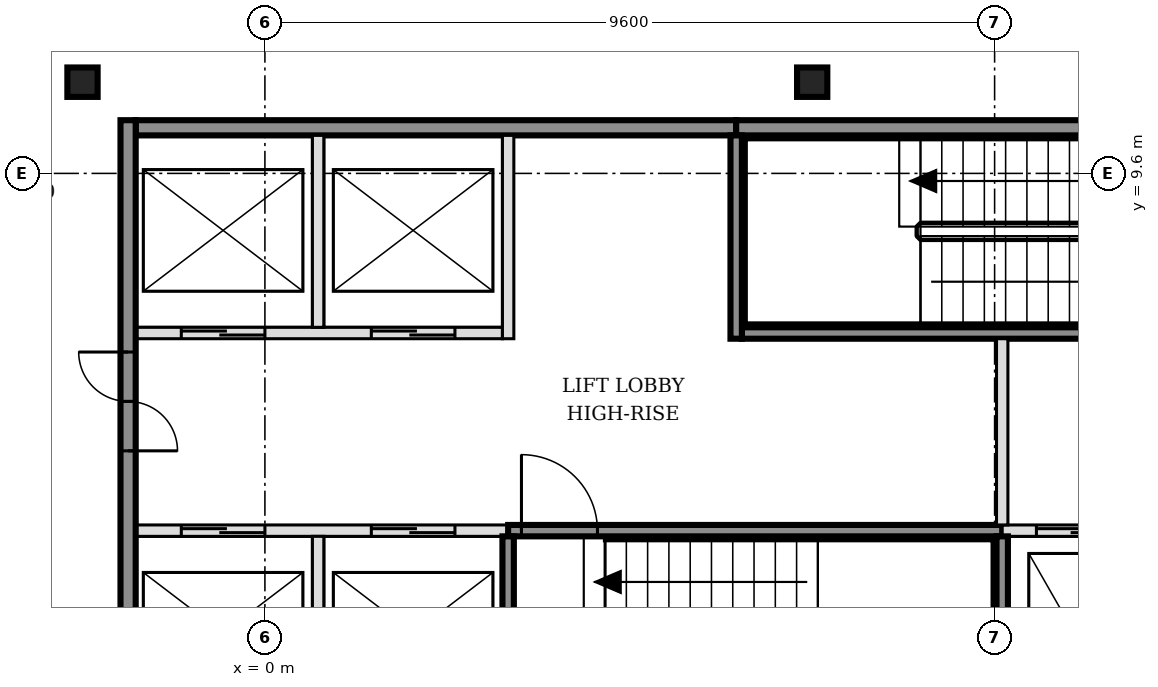
"""IFC4 building model, lengths in metres.
Left out: names, types, materials, properties, quantities, classifications, styles, units other than length and angle.
Written with IfcOpenShell. Run it as: python <this file> out.ifc"""

import sys

from ifc_helpers import new_model, si_unit, direction, frame, frame_2d, origin, origin_2d, place, context, subcontext, project, spatial, rectangle, i_section, extrude, element, fill, save


model = new_model("IFC4")
c1 = context("Model", 3, precision=1e-05, world=origin(), true_north=direction((0.0, 1.0)))
c2 = subcontext(c1, "Body", "Model", "MODEL_VIEW")
j1 = project(units=[si_unit("LENGTHUNIT", "METRE"), si_unit("PLANEANGLEUNIT", "RADIAN")], contexts=[c1])
p1 = place(None, origin())
s1 = spatial("IfcSite", under=j1, at=p1, CompositionType="ELEMENT")
p2 = place(p1, origin())
s2 = spatial("IfcBuilding", under=s1, at=p2, CompositionType="ELEMENT")
p3 = place(p2, frame((0.0, 0.0, 292.2)))
s3 = spatial("IfcBuildingStorey", under=s2, at=p3, CompositionType="ELEMENT", Elevation=292.2)
for number, where, z_axis, x_axis in (
    (1, (-2.4, 10.8, -0.15), (0.0, 0.0, 1.0), (1.0, 0.0, 0.0)),
    (2, (7.2, 10.8, -0.15), (0.0, 0.0, 1.0), (1.0, 0.0, 0.0)),
):
    element("IfcColumn", number, at=place(p3, frame(where, z_axis=z_axis, x_axis=x_axis)), inside=s3, PredefinedType="COLUMN", context=c2, shape_type="SweptSolid", body=[
        extrude(i_section(OverallWidth=0.398, OverallDepth=0.387, WebThickness=0.021, FlangeThickness=0.033, FilletRadius=0.015, at=origin_2d()), origin(), (0.0, 0.0, 1.0), 3.55),
    ])
p4 = place(p3, frame((-1.7, 4.9, 0.0), z_axis=(0.0, 0.0, 1.0), x_axis=(1.0, 0.0, 0.0)))
e3 = element("IfcWall", 3, at=p4, inside=s3, PredefinedType="SOLIDWALL", context=c2, shape_type="SweptSolid", body=[
    extrude(rectangle(XDim=4.9, YDim=0.15, at=frame_2d((2.45, 0.0))), origin(), (0.0, 0.0, 1.0), 3.4),
])
p5 = place(p4, frame((0.6, 0.0, 0.0)))
e4 = element("IfcOpeningElement", 4, at=p5, cuts=e3, PredefinedType="OPENING", context=c2, shape_type="SweptSolid", body=[
    extrude(rectangle(XDim=1.1, YDim=2.1, at=frame_2d((0.55, 1.05))), frame((0.0, 0.085, 0.0), z_axis=(0.0, -1.0, 0.0), x_axis=(1.0, 0.0, 0.0)), (0.0, 0.0, 1.0), 0.17),
])
p6 = place(p4, frame((3.1, 0.0, 0.0)))
e5 = element("IfcOpeningElement", 5, at=p6, cuts=e3, PredefinedType="OPENING", context=c2, shape_type="SweptSolid", body=[
    extrude(rectangle(XDim=1.1, YDim=2.1, at=frame_2d((0.55, 1.05))), frame((0.0, 0.085, 0.0), z_axis=(0.0, -1.0, 0.0), x_axis=(1.0, 0.0, 0.0)), (0.0, 0.0, 1.0), 0.17),
])
p7 = place(p3, frame((3.2, 4.9, 0.0), z_axis=(0.0, 0.0, 1.0), x_axis=(1.0, 0.0, 0.0)))
e6 = element("IfcWall", 6, at=p7, inside=s3, PredefinedType="SOLIDWALL", context=c2, shape_type="SweptSolid", body=[
    extrude(rectangle(XDim=6.5, YDim=0.15, at=frame_2d((3.25, 0.0))), origin(), (0.0, 0.0, 1.0), 3.4),
])
p8 = place(p7, frame((0.175, 0.0, 0.0)))
e7 = element("IfcOpeningElement", 7, at=p8, cuts=e6, PredefinedType="OPENING", context=c2, shape_type="SweptSolid", body=[
    extrude(rectangle(XDim=1.0, YDim=2.1, at=frame_2d((0.5, 1.05))), frame((0.0, 0.085, 0.0), z_axis=(0.0, -1.0, 0.0), x_axis=(1.0, 0.0, 0.0)), (0.0, 0.0, 1.0), 0.17),
])
p9 = place(p3, frame((9.7, 4.9, 0.0), z_axis=(0.0, 0.0, 1.0), x_axis=(1.0, 0.0, 0.0)))
e8 = element("IfcWall", 8, at=p9, inside=s3, PredefinedType="SOLIDWALL", context=c2, shape_type="SweptSolid", body=[
    extrude(rectangle(XDim=6.4, YDim=0.15, at=frame_2d((3.2, 0.0))), origin(), (0.0, 0.0, 1.0), 3.4),
])
p10 = place(p9, frame((0.45, 0.0, 0.0)))
e9 = element("IfcOpeningElement", 9, at=p10, cuts=e8, PredefinedType="OPENING", context=c2, shape_type="SweptSolid", body=[
    extrude(rectangle(XDim=1.0, YDim=2.1, at=frame_2d((0.5, 1.05))), frame((0.0, 0.085, 0.0), z_axis=(0.0, -1.0, 0.0), x_axis=(1.0, 0.0, 0.0)), (0.0, 0.0, 1.0), 0.17),
])
p11 = place(p9, frame((2.35, 0.0, 0.0)))
e10 = element("IfcOpeningElement", 10, at=p11, cuts=e8, PredefinedType="OPENING", context=c2, shape_type="SweptSolid", body=[
    extrude(rectangle(XDim=1.0, YDim=2.1, at=frame_2d((0.5, 1.05))), frame((0.0, 0.085, 0.0), z_axis=(0.0, -1.0, 0.0), x_axis=(1.0, 0.0, 0.0)), (0.0, 0.0, 1.0), 0.17),
])
p12 = place(p9, frame((4.7, 0.0, 0.0)))
e11 = element("IfcOpeningElement", 11, at=p12, cuts=e8, PredefinedType="OPENING", context=c2, shape_type="SweptSolid", body=[
    extrude(rectangle(XDim=0.9, YDim=2.1, at=frame_2d((0.45, 1.05))), frame((0.0, 0.085, 0.0), z_axis=(0.0, -1.0, 0.0), x_axis=(1.0, 0.0, 0.0)), (0.0, 0.0, 1.0), 0.17),
])
p13 = place(p3, frame((-1.7, 7.5, 0.0), z_axis=(0.0, 0.0, 1.0), x_axis=(1.0, 0.0, 0.0)))
e12 = element("IfcWall", 12, at=p13, inside=s3, PredefinedType="SOLIDWALL", context=c2, shape_type="SweptSolid", body=[
    extrude(rectangle(XDim=4.825, YDim=0.15, at=frame_2d((2.413, 0.0))), origin(), (0.0, 0.0, 1.0), 3.4),
])
p14 = place(p13, frame((0.6, 0.0, 0.0)))
e13 = element("IfcOpeningElement", 13, at=p14, cuts=e12, PredefinedType="OPENING", context=c2, shape_type="SweptSolid", body=[
    extrude(rectangle(XDim=1.1, YDim=2.1, at=frame_2d((0.55, 1.05))), frame((0.0, 0.085, 0.0), z_axis=(0.0, -1.0, 0.0), x_axis=(1.0, 0.0, 0.0)), (0.0, 0.0, 1.0), 0.17),
])
p15 = place(p13, frame((3.1, 0.0, 0.0)))
e14 = element("IfcOpeningElement", 14, at=p15, cuts=e12, PredefinedType="OPENING", context=c2, shape_type="SweptSolid", body=[
    extrude(rectangle(XDim=1.1, YDim=2.1, at=frame_2d((0.55, 1.05))), frame((0.0, 0.085, 0.0), z_axis=(0.0, -1.0, 0.0), x_axis=(1.0, 0.0, 0.0)), (0.0, 0.0, 1.0), 0.17),
])
p16 = place(p3, frame((6.275, 7.5, 0.0), z_axis=(0.0, 0.0, 1.0), x_axis=(1.0, 0.0, 0.0)))
e15 = element("IfcWall", 15, at=p16, inside=s3, PredefinedType="SOLIDWALL", context=c2, shape_type="SweptSolid", body=[
    extrude(rectangle(XDim=6.425, YDim=0.15, at=frame_2d((3.212, 0.0))), origin(), (0.0, 0.0, 1.0), 3.4),
])
p17 = place(p16, frame((5.225, 0.0, 0.0)))
e16 = element("IfcOpeningElement", 16, at=p17, cuts=e15, PredefinedType="OPENING", context=c2, shape_type="SweptSolid", body=[
    extrude(rectangle(XDim=1.0, YDim=2.1, at=frame_2d((0.5, 1.05))), frame((0.0, 0.085, 0.0), z_axis=(0.0, -1.0, 0.0), x_axis=(1.0, 0.0, 0.0)), (0.0, 0.0, 1.0), 0.17),
])
p18 = place(p3, frame((-1.7, 10.2, 0.0), z_axis=(0.0, 0.0, 1.0), x_axis=(1.0, 0.0, 0.0)))
e17 = element("IfcWall", 17, at=p18, inside=s3, PredefinedType="SOLIDWALL", context=c2, shape_type="SweptSolid", body=[
    extrude(rectangle(XDim=7.9, YDim=0.2, at=frame_2d((3.95, 0.0))), origin(), (0.0, 0.0, 1.0), 3.4),
])
p19 = place(p3, frame((6.2, 10.2, 0.0), z_axis=(0.0, 0.0, 1.0), x_axis=(1.0, 0.0, 0.0)))
e18 = element("IfcWall", 18, at=p19, inside=s3, PredefinedType="SOLIDWALL", context=c2, shape_type="SweptSolid", body=[
    extrude(rectangle(XDim=6.5, YDim=0.2, at=frame_2d((3.25, 0.0))), origin(), (0.0, 0.0, 1.0), 3.4),
])
p20 = place(p3, frame((-1.8, -5.5, 0.0), z_axis=(0.0, 0.0, 1.0), x_axis=(0.0, 1.0, 0.0)))
e19 = element("IfcWall", 19, at=p20, inside=s3, PredefinedType="SOLIDWALL", context=c2, shape_type="SweptSolid", body=[
    extrude(rectangle(XDim=15.8, YDim=0.2, at=frame_2d((7.9, 0.0))), origin(), (0.0, 0.0, 1.0), 3.4),
])
p21 = place(p20, frame((3.05, 0.0, 0.0)))
e20 = element("IfcOpeningElement", 20, at=p21, cuts=e19, PredefinedType="OPENING", context=c2, shape_type="SweptSolid", body=[
    extrude(rectangle(XDim=1.3, YDim=2.1, at=frame_2d((0.65, 1.05))), frame((0.0, 0.11, 0.0), z_axis=(0.0, -1.0, 0.0), x_axis=(1.0, 0.0, 0.0)), (0.0, 0.0, 1.0), 0.22),
])
p22 = place(p20, frame((11.45, 0.0, 0.0)))
e21 = element("IfcOpeningElement", 21, at=p22, cuts=e19, PredefinedType="OPENING", context=c2, shape_type="SweptSolid", body=[
    extrude(rectangle(XDim=1.3, YDim=2.1, at=frame_2d((0.65, 1.05))), frame((0.0, 0.11, 0.0), z_axis=(0.0, -1.0, 0.0), x_axis=(1.0, 0.0, 0.0)), (0.0, 0.0, 1.0), 0.22),
])
p23 = place(p3, frame((0.7, 2.275, 0.0), z_axis=(0.0, 0.0, 1.0), x_axis=(0.0, 1.0, 0.0)))
e22 = element("IfcWall", 22, at=p23, inside=s3, PredefinedType="SOLIDWALL", context=c2, shape_type="SweptSolid", body=[
    extrude(rectangle(XDim=2.55, YDim=0.15, at=frame_2d((1.275, 0.0))), origin(), (0.0, 0.0, 1.0), 3.4),
])
p24 = place(p3, frame((0.7, 7.575, 0.0), z_axis=(0.0, 0.0, 1.0), x_axis=(0.0, 1.0, 0.0)))
e23 = element("IfcWall", 23, at=p24, inside=s3, PredefinedType="SOLIDWALL", context=c2, shape_type="SweptSolid", body=[
    extrude(rectangle(XDim=2.525, YDim=0.15, at=frame_2d((1.263, 0.0))), origin(), (0.0, 0.0, 1.0), 3.4),
])
p25 = place(p3, frame((3.2, 2.275, 0.0), z_axis=(0.0, 0.0, 1.0), x_axis=(0.0, 1.0, 0.0)))
e24 = element("IfcWall", 24, at=p25, inside=s3, PredefinedType="SOLIDWALL", context=c2, shape_type="SweptSolid", body=[
    extrude(rectangle(XDim=2.55, YDim=0.15, at=frame_2d((1.275, 0.0))), origin(), (0.0, 0.0, 1.0), 3.4),
])
for number, where, z_axis, x_axis in (
    (25, (3.2, 7.425, 0.0), (0.0, 0.0, 1.0), (0.0, 1.0, 0.0)),
    (26, (6.2, 7.425, 0.0), (0.0, 0.0, 1.0), (0.0, 1.0, 0.0)),
):
    element("IfcWall", number, at=place(p3, frame(where, z_axis=z_axis, x_axis=x_axis)), inside=s3, PredefinedType="SOLIDWALL", context=c2, shape_type="SweptSolid", body=[
        extrude(rectangle(XDim=2.675, YDim=0.15, at=frame_2d((1.337, 0.0))), origin(), (0.0, 0.0, 1.0), 3.4),
    ])
p26 = place(p3, frame((9.7, 2.275, 0.0), z_axis=(0.0, 0.0, 1.0), x_axis=(0.0, 1.0, 0.0)))
e27 = element("IfcWall", 27, at=p26, inside=s3, PredefinedType="SOLIDWALL", context=c2, shape_type="SweptSolid", body=[
    extrude(rectangle(XDim=2.55, YDim=0.15, at=frame_2d((1.275, 0.0))), origin(), (0.0, 0.0, 1.0), 3.4),
])
p27 = place(p3, frame((9.7, 4.975, 0.0), z_axis=(0.0, 0.0, 1.0), x_axis=(0.0, 1.0, 0.0)))
e28 = element("IfcWall", 28, at=p27, inside=s3, PredefinedType="SOLIDWALL", context=c2, shape_type="SweptSolid", body=[
    extrude(rectangle(XDim=2.45, YDim=0.15, at=frame_2d((1.225, 0.0))), origin(), (0.0, 0.0, 1.0), 3.4),
])
p28 = place(p5, origin())
e29 = element("IfcDoor", 29, at=p28, inside=s3, OperationType="DOUBLE_DOOR_SLIDING", PredefinedType="DOOR", context=c2, shape_type="SweptSolid", body=[
    extrude(rectangle(XDim=1.1, YDim=2.1, at=frame_2d((0.55, 1.05))), frame((0.0, 0.025, 0.0), z_axis=(0.0, -1.0, 0.0), x_axis=(1.0, 0.0, 0.0)), (0.0, 0.0, 1.0), 0.05),
])
fill(e4, e29)
p29 = place(p6, origin())
e30 = element("IfcDoor", 30, at=p29, inside=s3, OperationType="DOUBLE_DOOR_SLIDING", PredefinedType="DOOR", context=c2, shape_type="SweptSolid", body=[
    extrude(rectangle(XDim=1.1, YDim=2.1, at=frame_2d((0.55, 1.05))), frame((0.0, 0.025, 0.0), z_axis=(0.0, -1.0, 0.0), x_axis=(1.0, 0.0, 0.0)), (0.0, 0.0, 1.0), 0.05),
])
fill(e5, e30)
p30 = place(p14, origin())
e31 = element("IfcDoor", 31, at=p30, inside=s3, OperationType="DOUBLE_DOOR_SLIDING", PredefinedType="DOOR", context=c2, shape_type="SweptSolid", body=[
    extrude(rectangle(XDim=1.1, YDim=2.1, at=frame_2d((0.55, 1.05))), frame((0.0, 0.025, 0.0), z_axis=(0.0, -1.0, 0.0), x_axis=(1.0, 0.0, 0.0)), (0.0, 0.0, 1.0), 0.05),
])
fill(e13, e31)
p31 = place(p15, origin())
e32 = element("IfcDoor", 32, at=p31, inside=s3, OperationType="DOUBLE_DOOR_SLIDING", PredefinedType="DOOR", context=c2, shape_type="SweptSolid", body=[
    extrude(rectangle(XDim=1.1, YDim=2.1, at=frame_2d((0.55, 1.05))), frame((0.0, 0.025, 0.0), z_axis=(0.0, -1.0, 0.0), x_axis=(1.0, 0.0, 0.0)), (0.0, 0.0, 1.0), 0.05),
])
fill(e14, e32)
p32 = place(p10, origin())
e33 = element("IfcDoor", 33, at=p32, inside=s3, OperationType="DOUBLE_DOOR_SLIDING", PredefinedType="DOOR", context=c2, shape_type="SweptSolid", body=[
    extrude(rectangle(XDim=1.0, YDim=2.1, at=frame_2d((0.5, 1.05))), frame((0.0, 0.025, 0.0), z_axis=(0.0, -1.0, 0.0), x_axis=(1.0, 0.0, 0.0)), (0.0, 0.0, 1.0), 0.05),
])
fill(e9, e33)
p33 = place(p8, origin())
e34 = element("IfcDoor", 34, at=p33, inside=s3, OperationType="SINGLE_SWING_LEFT", PredefinedType="DOOR", context=c2, shape_type="SweptSolid", body=[
    extrude(rectangle(XDim=1.0, YDim=2.1, at=frame_2d((0.5, 1.05))), frame((0.0, 0.025, 0.0), z_axis=(0.0, -1.0, 0.0), x_axis=(1.0, 0.0, 0.0)), (0.0, 0.0, 1.0), 0.05),
])
fill(e7, e34)
p34 = place(p22, origin())
e35 = element("IfcDoor", 35, at=p34, inside=s3, OperationType="DOUBLE_DOOR_SINGLE_SWING", PredefinedType="DOOR", context=c2, shape_type="SweptSolid", body=[
    extrude(rectangle(XDim=1.3, YDim=2.1, at=frame_2d((0.65, 1.05))), frame((0.0, 0.025, 0.0), z_axis=(0.0, -1.0, 0.0), x_axis=(1.0, 0.0, 0.0)), (0.0, 0.0, 1.0), 0.05),
])
fill(e21, e35)
save(model, sys.argv[1])
